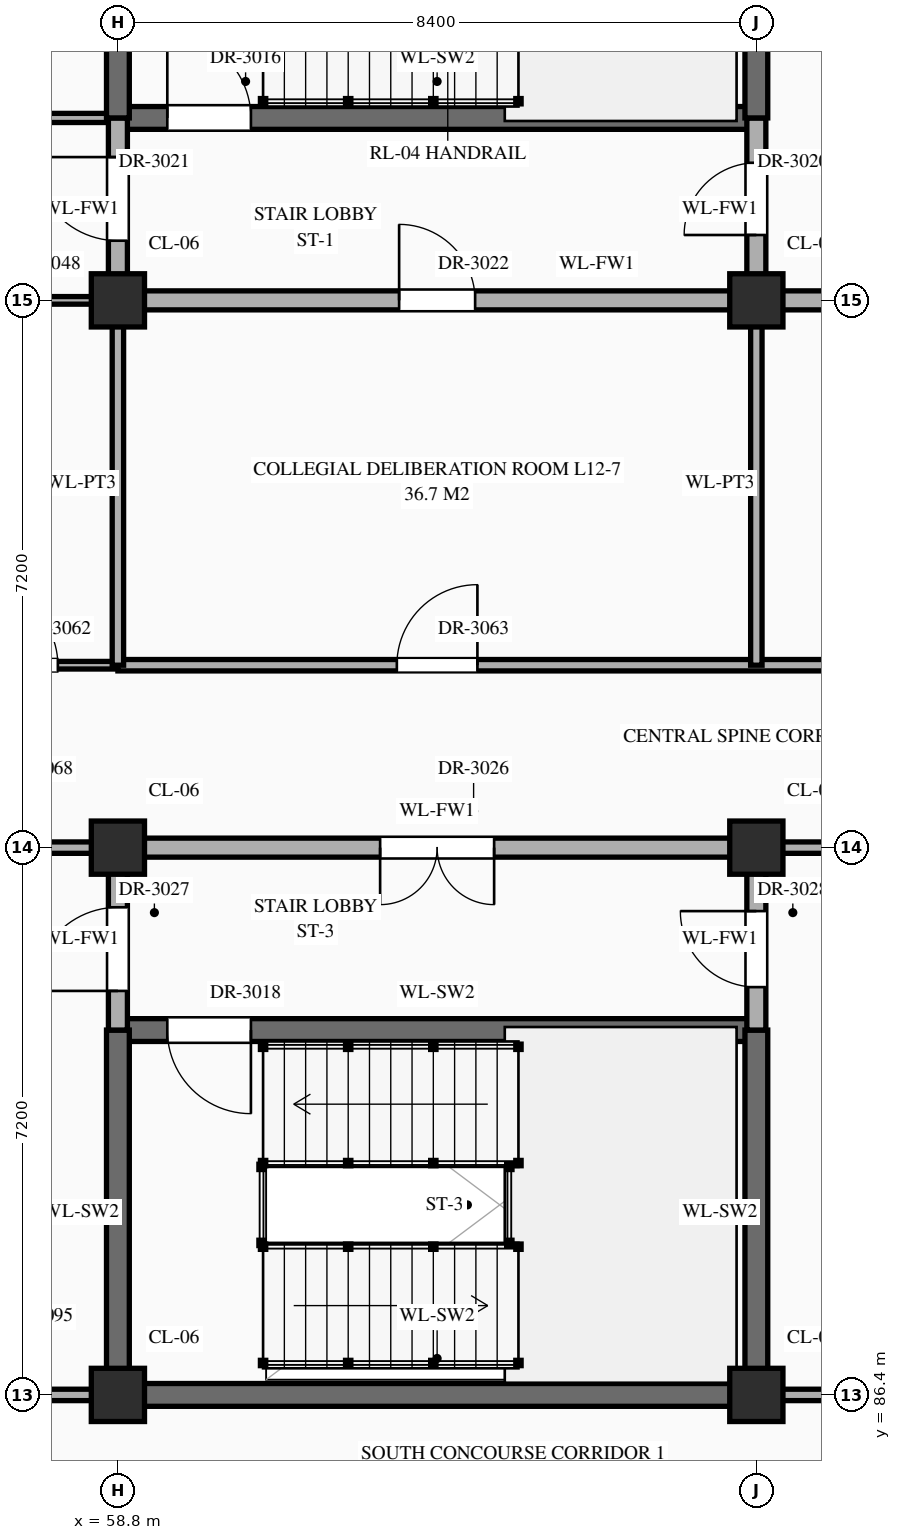
"""IFC4 building model, lengths in metres.
Left out: names, types, materials, properties, quantities, classifications, styles, units other than length and angle.
Written with IfcOpenShell. Run it as: python <this file> out.ifc"""

import sys

from ifc_helpers import new_model, si_unit, direction, frame, frame_2d, origin, origin_2d, place, context, subcontext, project, spatial, rectangle, extrude, element, fill, save


model = new_model("IFC4")
c1 = context("Model", 3, precision=1e-05, world=origin(), true_north=direction((0.0, 1.0)))
c2 = subcontext(c1, "Body", "Model", "MODEL_VIEW")
j1 = project(units=[si_unit("LENGTHUNIT", "METRE"), si_unit("PLANEANGLEUNIT", "RADIAN")], contexts=[c1])
p1 = place(None, origin())
s1 = spatial("IfcSite", under=j1, at=p1, CompositionType="ELEMENT")
p2 = place(p1, origin())
s2 = spatial("IfcBuilding", under=s1, at=p2, CompositionType="ELEMENT")
p3 = place(p2, frame((0.0, 0.0, 51.9)))
s3 = spatial("IfcBuildingStorey", under=s2, at=p3, CompositionType="ELEMENT", Elevation=51.9)
for number, where, z_axis, x_axis in (
    (1, (58.8, 86.4, 0.0), (0.0, 0.0, 1.0), (1.0, 0.0, 0.0)),
    (2, (58.8, 93.6, 0.0), (0.0, 0.0, 1.0), (1.0, 0.0, 0.0)),
    (3, (58.8, 100.8, 0.0), (0.0, 0.0, 1.0), (1.0, 0.0, 0.0)),
    (4, (67.2, 86.4, 0.0), (0.0, 0.0, 1.0), (1.0, 0.0, 0.0)),
    (5, (67.2, 93.6, 0.0), (0.0, 0.0, 1.0), (1.0, 0.0, 0.0)),
    (6, (67.2, 100.8, 0.0), (0.0, 0.0, 1.0), (1.0, 0.0, 0.0)),
):
    element("IfcColumn", number, at=place(p3, frame(where, z_axis=z_axis, x_axis=x_axis)), inside=s3, PredefinedType="COLUMN", context=c2, shape_type="SweptSolid", body=[
        extrude(rectangle(XDim=0.7, YDim=0.7, at=origin_2d()), origin(), (0.0, 0.0, 1.0), 4.2),
    ])
p4 = place(p3, frame((56.0, 86.4, 0.0), z_axis=(0.0, 0.0, 1.0), x_axis=(1.0, 0.0, 0.0)))
e7 = element("IfcWall", 7, at=p4, inside=s3, PredefinedType="STANDARD", context=c2, shape_type="SweptSolid", body=[
    extrude(rectangle(XDim=2.8, YDim=0.15, at=frame_2d((1.4, 0.0))), origin(), (0.0, 0.0, 1.0), 3.11),
])
p5 = place(p4, frame((0.775, 0.0, 0.0)))
e8 = element("IfcOpeningElement", 8, at=p5, cuts=e7, PredefinedType="OPENING", context=c2, shape_type="SweptSolid", body=[
    extrude(rectangle(XDim=0.98, YDim=2.35, at=frame_2d((0.49, 1.175))), frame((0.0, 0.087, 0.0), z_axis=(0.0, -1.0, 0.0), x_axis=(1.0, 0.0, 0.0)), (0.0, 0.0, 1.0), 0.174),
])
p6 = place(p3, frame((58.8, 86.4, 0.0), z_axis=(0.0, 0.0, 1.0), x_axis=(1.0, 0.0, 0.0)))
e9 = element("IfcWall", 9, at=p6, inside=s3, PredefinedType="SHEAR", context=c2, shape_type="SweptSolid", body=[
    extrude(rectangle(XDim=8.4, YDim=0.3, at=frame_2d((4.2, 0.0))), origin(), (0.0, 0.0, 1.0), 3.96),
])
p7 = place(p3, frame((67.2, 86.4, 0.0), z_axis=(0.0, 0.0, 1.0), x_axis=(1.0, 0.0, 0.0)))
e10 = element("IfcWall", 10, at=p7, inside=s3, PredefinedType="STANDARD", context=c2, shape_type="SweptSolid", body=[
    extrude(rectangle(XDim=8.4, YDim=0.15, at=frame_2d((4.2, 0.0))), origin(), (0.0, 0.0, 1.0), 3.11),
])
p8 = place(p7, frame((3.69, 0.0, 0.0)))
e11 = element("IfcOpeningElement", 11, at=p8, cuts=e10, PredefinedType="OPENING", context=c2, shape_type="SweptSolid", body=[
    extrude(rectangle(XDim=1.02, YDim=2.4, at=frame_2d((0.51, 1.2))), frame((0.0, 0.087, 0.0), z_axis=(0.0, -1.0, 0.0), x_axis=(1.0, 0.0, 0.0)), (0.0, 0.0, 1.0), 0.174),
])
p9 = place(p3, frame((58.8, 91.2, 0.0), z_axis=(0.0, 0.0, 1.0), x_axis=(1.0, 0.0, 0.0)))
e12 = element("IfcWall", 12, at=p9, inside=s3, PredefinedType="SHEAR", context=c2, shape_type="SweptSolid", body=[
    extrude(rectangle(XDim=8.4, YDim=0.3, at=frame_2d((4.2, 0.0))), origin(), (0.0, 0.0, 1.0), 3.96),
])
p10 = place(p9, frame((0.65, 0.0, 0.0)))
e13 = element("IfcOpeningElement", 13, at=p10, cuts=e12, PredefinedType="OPENING", context=c2, shape_type="SweptSolid", body=[
    extrude(rectangle(XDim=1.1, YDim=2.2, at=frame_2d((0.55, 1.1))), frame((0.0, 0.162, 0.0), z_axis=(0.0, -1.0, 0.0), x_axis=(1.0, 0.0, 0.0)), (0.0, 0.0, 1.0), 0.324),
])
p11 = place(p3, frame((56.0, 93.6, 0.0), z_axis=(0.0, 0.0, 1.0), x_axis=(1.0, 0.0, 0.0)))
e14 = element("IfcWall", 14, at=p11, inside=s3, PredefinedType="STANDARD", context=c2, shape_type="SweptSolid", body=[
    extrude(rectangle(XDim=2.8, YDim=0.15, at=frame_2d((1.4, 0.0))), origin(), (0.0, 0.0, 1.0), 3.11),
])
p12 = place(p11, frame((0.785, 0.0, 0.0)))
e15 = element("IfcOpeningElement", 15, at=p12, cuts=e14, PredefinedType="OPENING", context=c2, shape_type="SweptSolid", body=[
    extrude(rectangle(XDim=0.96, YDim=2.2, at=frame_2d((0.48, 1.1))), frame((0.0, 0.087, 0.0), z_axis=(0.0, -1.0, 0.0), x_axis=(1.0, 0.0, 0.0)), (0.0, 0.0, 1.0), 0.174),
])
p13 = place(p3, frame((58.8, 93.6, 0.0), z_axis=(0.0, 0.0, 1.0), x_axis=(1.0, 0.0, 0.0)))
e16 = element("IfcWall", 16, at=p13, inside=s3, PredefinedType="STANDARD", context=c2, shape_type="SweptSolid", body=[
    extrude(rectangle(XDim=8.4, YDim=0.25, at=frame_2d((4.2, 0.0))), origin(), (0.0, 0.0, 1.0), 3.11),
])
p14 = place(p13, frame((3.45, 0.0, 0.0)))
e17 = element("IfcOpeningElement", 17, at=p14, cuts=e16, PredefinedType="OPENING", context=c2, shape_type="SweptSolid", body=[
    extrude(rectangle(XDim=1.5, YDim=2.25, at=frame_2d((0.75, 1.125))), frame((0.0, 0.137, 0.0), z_axis=(0.0, -1.0, 0.0), x_axis=(1.0, 0.0, 0.0)), (0.0, 0.0, 1.0), 0.274),
])
p15 = place(p3, frame((67.2, 93.6, 0.0), z_axis=(0.0, 0.0, 1.0), x_axis=(1.0, 0.0, 0.0)))
e18 = element("IfcWall", 18, at=p15, inside=s3, PredefinedType="STANDARD", context=c2, shape_type="SweptSolid", body=[
    extrude(rectangle(XDim=8.4, YDim=0.15, at=frame_2d((4.2, 0.0))), origin(), (0.0, 0.0, 1.0), 3.11),
])
p16 = place(p15, frame((3.7, 0.0, 0.0)))
e19 = element("IfcOpeningElement", 19, at=p16, cuts=e18, PredefinedType="OPENING", context=c2, shape_type="SweptSolid", body=[
    extrude(rectangle(XDim=1.0, YDim=2.25, at=frame_2d((0.5, 1.125))), frame((0.0, 0.087, 0.0), z_axis=(0.0, -1.0, 0.0), x_axis=(1.0, 0.0, 0.0)), (0.0, 0.0, 1.0), 0.174),
])
p17 = place(p3, frame((50.44, 96.0, 0.0), z_axis=(0.0, 0.0, 1.0), x_axis=(1.0, 0.0, 0.0)))
e20 = element("IfcWall", 20, at=p17, inside=s3, PredefinedType="STANDARD", context=c2, shape_type="SweptSolid", body=[
    extrude(rectangle(XDim=8.36, YDim=0.1, at=frame_2d((4.18, 0.0))), origin(), (0.0, 0.0, 1.0), 3.96),
])
p18 = place(p17, frame((1.21, 0.0, 0.0)))
e21 = element("IfcOpeningElement", 21, at=p18, cuts=e20, PredefinedType="OPENING", context=c2, shape_type="SweptSolid", body=[
    extrude(rectangle(XDim=0.94, YDim=2.3, at=frame_2d((0.47, 1.15))), frame((0.0, 0.062, 0.0), z_axis=(0.0, -1.0, 0.0), x_axis=(1.0, 0.0, 0.0)), (0.0, 0.0, 1.0), 0.124),
])
p19 = place(p17, frame((4.07, 0.0, 0.0)))
e22 = element("IfcOpeningElement", 22, at=p19, cuts=e20, PredefinedType="OPENING", context=c2, shape_type="SweptSolid", body=[
    extrude(rectangle(XDim=0.98, YDim=2.35, at=frame_2d((0.49, 1.175))), frame((0.0, 0.062, 0.0), z_axis=(0.0, -1.0, 0.0), x_axis=(1.0, 0.0, 0.0)), (0.0, 0.0, 1.0), 0.124),
])
p20 = place(p17, frame((6.55, 0.0, 0.0)))
e23 = element("IfcOpeningElement", 23, at=p20, cuts=e20, PredefinedType="OPENING", context=c2, shape_type="SweptSolid", body=[
    extrude(rectangle(XDim=1.02, YDim=2.4, at=frame_2d((0.51, 1.2))), frame((0.0, 0.062, 0.0), z_axis=(0.0, -1.0, 0.0), x_axis=(1.0, 0.0, 0.0)), (0.0, 0.0, 1.0), 0.124),
])
p21 = place(p3, frame((58.8, 96.0, 0.0), z_axis=(0.0, 0.0, 1.0), x_axis=(1.0, 0.0, 0.0)))
e24 = element("IfcWall", 24, at=p21, inside=s3, PredefinedType="STANDARD", context=c2, shape_type="SweptSolid", body=[
    extrude(rectangle(XDim=25.2, YDim=0.15, at=frame_2d((12.6, 0.0))), origin(), (0.0, 0.0, 1.0), 3.96),
])
p22 = place(p21, frame((3.67, 0.0, 0.0)))
e25 = element("IfcOpeningElement", 25, at=p22, cuts=e24, PredefinedType="OPENING", context=c2, shape_type="SweptSolid", body=[
    extrude(rectangle(XDim=1.06, YDim=2.4, at=frame_2d((0.53, 1.2))), frame((0.0, 0.087, 0.0), z_axis=(0.0, -1.0, 0.0), x_axis=(1.0, 0.0, 0.0)), (0.0, 0.0, 1.0), 0.174),
])
p23 = place(p21, frame((12.03, 0.0, 0.0)))
e26 = element("IfcOpeningElement", 26, at=p23, cuts=e24, PredefinedType="OPENING", context=c2, shape_type="SweptSolid", body=[
    extrude(rectangle(XDim=1.14, YDim=2.4, at=frame_2d((0.57, 1.2))), frame((0.0, 0.087, 0.0), z_axis=(0.0, -1.0, 0.0), x_axis=(1.0, 0.0, 0.0)), (0.0, 0.0, 1.0), 0.174),
])
p24 = place(p21, frame((20.55, 0.0, 0.0)))
e27 = element("IfcOpeningElement", 27, at=p24, cuts=e24, PredefinedType="OPENING", context=c2, shape_type="SweptSolid", body=[
    extrude(rectangle(XDim=0.9, YDim=2.15, at=frame_2d((0.45, 1.075))), frame((0.0, 0.087, 0.0), z_axis=(0.0, -1.0, 0.0), x_axis=(1.0, 0.0, 0.0)), (0.0, 0.0, 1.0), 0.174),
])
p25 = place(p3, frame((50.44, 100.8, 0.0), z_axis=(0.0, 0.0, 1.0), x_axis=(1.0, 0.0, 0.0)))
e28 = element("IfcWall", 28, at=p25, inside=s3, PredefinedType="STANDARD", context=c2, shape_type="SweptSolid", body=[
    extrude(rectangle(XDim=8.36, YDim=0.1, at=frame_2d((4.18, 0.0))), origin(), (0.0, 0.0, 1.0), 3.11),
])
p26 = place(p25, frame((1.265, 0.0, 0.0)))
e29 = element("IfcOpeningElement", 29, at=p26, cuts=e28, PredefinedType="OPENING", context=c2, shape_type="SweptSolid", body=[
    extrude(rectangle(XDim=1.06, YDim=2.4, at=frame_2d((0.53, 1.2))), frame((0.0, 0.062, 0.0), z_axis=(0.0, -1.0, 0.0), x_axis=(1.0, 0.0, 0.0)), (0.0, 0.0, 1.0), 0.124),
])
p27 = place(p25, frame((3.99, 0.0, 0.0)))
e30 = element("IfcOpeningElement", 30, at=p27, cuts=e28, PredefinedType="OPENING", context=c2, shape_type="SweptSolid", body=[
    extrude(rectangle(XDim=1.14, YDim=2.4, at=frame_2d((0.57, 1.2))), frame((0.0, 0.062, 0.0), z_axis=(0.0, -1.0, 0.0), x_axis=(1.0, 0.0, 0.0)), (0.0, 0.0, 1.0), 0.124),
])
p28 = place(p25, frame((6.475, 0.0, 0.0)))
e31 = element("IfcOpeningElement", 31, at=p28, cuts=e28, PredefinedType="OPENING", context=c2, shape_type="SweptSolid", body=[
    extrude(rectangle(XDim=0.9, YDim=2.15, at=frame_2d((0.45, 1.075))), frame((0.0, 0.062, 0.0), z_axis=(0.0, -1.0, 0.0), x_axis=(1.0, 0.0, 0.0)), (0.0, 0.0, 1.0), 0.124),
])
p29 = place(p3, frame((58.8, 100.8, 0.0), z_axis=(0.0, 0.0, 1.0), x_axis=(1.0, 0.0, 0.0)))
e32 = element("IfcWall", 32, at=p29, inside=s3, PredefinedType="STANDARD", context=c2, shape_type="SweptSolid", body=[
    extrude(rectangle(XDim=12.6, YDim=0.25, at=frame_2d((6.3, 0.0))), origin(), (0.0, 0.0, 1.0), 3.11),
])
p30 = place(p29, frame((3.7, 0.0, 0.0)))
e33 = element("IfcOpeningElement", 33, at=p30, cuts=e32, PredefinedType="OPENING", context=c2, shape_type="SweptSolid", body=[
    extrude(rectangle(XDim=1.0, YDim=2.2, at=frame_2d((0.5, 1.1))), frame((0.0, 0.137, 0.0), z_axis=(0.0, -1.0, 0.0), x_axis=(1.0, 0.0, 0.0)), (0.0, 0.0, 1.0), 0.274),
])
p31 = place(p3, frame((50.44, 103.2, 0.0), z_axis=(0.0, 0.0, 1.0), x_axis=(1.0, 0.0, 0.0)))
e34 = element("IfcWall", 34, at=p31, inside=s3, PredefinedType="STANDARD", context=c2, shape_type="SweptSolid", body=[
    extrude(rectangle(XDim=8.36, YDim=0.12, at=frame_2d((4.18, 0.0))), origin(), (0.0, 0.0, 1.0), 3.96),
])
p32 = place(p31, frame((3.67, 0.0, 0.0)))
e35 = element("IfcOpeningElement", 35, at=p32, cuts=e34, PredefinedType="OPENING", context=c2, shape_type="SweptSolid", body=[
    extrude(rectangle(XDim=1.02, YDim=2.4, at=frame_2d((0.51, 1.2))), frame((0.0, 0.072, 0.0), z_axis=(0.0, -1.0, 0.0), x_axis=(1.0, 0.0, 0.0)), (0.0, 0.0, 1.0), 0.144),
])
p33 = place(p3, frame((58.8, 103.2, 0.0), z_axis=(0.0, 0.0, 1.0), x_axis=(1.0, 0.0, 0.0)))
e36 = element("IfcWall", 36, at=p33, inside=s3, PredefinedType="SHEAR", context=c2, shape_type="SweptSolid", body=[
    extrude(rectangle(XDim=8.4, YDim=0.3, at=frame_2d((4.2, 0.0))), origin(), (0.0, 0.0, 1.0), 3.96),
])
p34 = place(p33, frame((0.65, 0.0, 0.0)))
e37 = element("IfcOpeningElement", 37, at=p34, cuts=e36, PredefinedType="OPENING", context=c2, shape_type="SweptSolid", body=[
    extrude(rectangle(XDim=1.1, YDim=2.2, at=frame_2d((0.55, 1.1))), frame((0.0, 0.162, 0.0), z_axis=(0.0, -1.0, 0.0), x_axis=(1.0, 0.0, 0.0)), (0.0, 0.0, 1.0), 0.324),
])
p35 = place(p3, frame((58.8, 86.4, 0.0), z_axis=(0.0, 0.0, 1.0), x_axis=(0.0, 1.0, 0.0)))
e38 = element("IfcWall", 38, at=p35, inside=s3, PredefinedType="SHEAR", context=c2, shape_type="SweptSolid", body=[
    extrude(rectangle(XDim=4.8, YDim=0.3, at=frame_2d((2.4, 0.0))), origin(), (0.0, 0.0, 1.0), 3.96),
])
p36 = place(p3, frame((58.8, 91.2, 0.0), z_axis=(0.0, 0.0, 1.0), x_axis=(0.0, 1.0, 0.0)))
e39 = element("IfcWall", 39, at=p36, inside=s3, PredefinedType="STANDARD", context=c2, shape_type="SweptSolid", body=[
    extrude(rectangle(XDim=2.4, YDim=0.25, at=frame_2d((1.2, 0.0))), origin(), (0.0, 0.0, 1.0), 3.21),
])
p37 = place(p36, frame((0.515, 0.0, 0.0)))
e40 = element("IfcOpeningElement", 40, at=p37, cuts=e39, PredefinedType="OPENING", context=c2, shape_type="SweptSolid", body=[
    extrude(rectangle(XDim=1.1, YDim=2.2, at=frame_2d((0.55, 1.1))), frame((0.0, 0.137, 0.0), z_axis=(0.0, -1.0, 0.0), x_axis=(1.0, 0.0, 0.0)), (0.0, 0.0, 1.0), 0.274),
])
p38 = place(p3, frame((58.8, 96.0, 0.0), z_axis=(0.0, 0.0, 1.0), x_axis=(0.0, 1.0, 0.0)))
e41 = element("IfcWall", 41, at=p38, inside=s3, PredefinedType="STANDARD", context=c2, shape_type="SweptSolid", body=[
    extrude(rectangle(XDim=4.8, YDim=0.15, at=frame_2d((2.4, 0.0))), origin(), (0.0, 0.0, 1.0), 3.21),
])
p39 = place(p3, frame((58.8, 100.8, 0.0), z_axis=(0.0, 0.0, 1.0), x_axis=(0.0, 1.0, 0.0)))
e42 = element("IfcWall", 42, at=p39, inside=s3, PredefinedType="STANDARD", context=c2, shape_type="SweptSolid", body=[
    extrude(rectangle(XDim=2.4, YDim=0.25, at=frame_2d((1.2, 0.0))), origin(), (0.0, 0.0, 1.0), 3.21),
])
p40 = place(p39, frame((0.785, 0.0, 0.0)))
e43 = element("IfcOpeningElement", 43, at=p40, cuts=e42, PredefinedType="OPENING", context=c2, shape_type="SweptSolid", body=[
    extrude(rectangle(XDim=1.1, YDim=2.2, at=frame_2d((0.55, 1.1))), frame((0.0, 0.137, 0.0), z_axis=(0.0, -1.0, 0.0), x_axis=(1.0, 0.0, 0.0)), (0.0, 0.0, 1.0), 0.274),
])
p41 = place(p3, frame((58.8, 103.2, 0.0), z_axis=(0.0, 0.0, 1.0), x_axis=(0.0, 1.0, 0.0)))
e44 = element("IfcWall", 44, at=p41, inside=s3, PredefinedType="SHEAR", context=c2, shape_type="SweptSolid", body=[
    extrude(rectangle(XDim=4.76, YDim=0.3, at=frame_2d((2.38, 0.0))), origin(), (0.0, 0.0, 1.0), 3.96),
])
p42 = place(p3, frame((67.2, 86.4, 0.0), z_axis=(0.0, 0.0, 1.0), x_axis=(0.0, 1.0, 0.0)))
e45 = element("IfcWall", 45, at=p42, inside=s3, PredefinedType="SHEAR", context=c2, shape_type="SweptSolid", body=[
    extrude(rectangle(XDim=4.8, YDim=0.3, at=frame_2d((2.4, 0.0))), origin(), (0.0, 0.0, 1.0), 3.96),
])
p43 = place(p3, frame((67.2, 91.2, 0.0), z_axis=(0.0, 0.0, 1.0), x_axis=(0.0, 1.0, 0.0)))
e46 = element("IfcWall", 46, at=p43, inside=s3, PredefinedType="STANDARD", context=c2, shape_type="SweptSolid", body=[
    extrude(rectangle(XDim=2.4, YDim=0.25, at=frame_2d((1.2, 0.0))), origin(), (0.0, 0.0, 1.0), 3.21),
])
p44 = place(p43, frame((0.565, 0.0, 0.0)))
e47 = element("IfcOpeningElement", 47, at=p44, cuts=e46, PredefinedType="OPENING", context=c2, shape_type="SweptSolid", body=[
    extrude(rectangle(XDim=1.0, YDim=2.2, at=frame_2d((0.5, 1.1))), frame((0.0, 0.137, 0.0), z_axis=(0.0, -1.0, 0.0), x_axis=(1.0, 0.0, 0.0)), (0.0, 0.0, 1.0), 0.274),
])
p45 = place(p3, frame((67.2, 96.0, 0.0), z_axis=(0.0, 0.0, 1.0), x_axis=(0.0, 1.0, 0.0)))
e48 = element("IfcWall", 48, at=p45, inside=s3, PredefinedType="STANDARD", context=c2, shape_type="SweptSolid", body=[
    extrude(rectangle(XDim=4.8, YDim=0.15, at=frame_2d((2.4, 0.0))), origin(), (0.0, 0.0, 1.0), 3.21),
])
p46 = place(p3, frame((67.2, 100.8, 0.0), z_axis=(0.0, 0.0, 1.0), x_axis=(0.0, 1.0, 0.0)))
e49 = element("IfcWall", 49, at=p46, inside=s3, PredefinedType="STANDARD", context=c2, shape_type="SweptSolid", body=[
    extrude(rectangle(XDim=2.4, YDim=0.25, at=frame_2d((1.2, 0.0))), origin(), (0.0, 0.0, 1.0), 3.21),
])
p47 = place(p46, frame((0.86, 0.0, 0.0)))
e50 = element("IfcOpeningElement", 50, at=p47, cuts=e49, PredefinedType="OPENING", context=c2, shape_type="SweptSolid", body=[
    extrude(rectangle(XDim=0.95, YDim=2.15, at=frame_2d((0.475, 1.075))), frame((0.0, 0.137, 0.0), z_axis=(0.0, -1.0, 0.0), x_axis=(1.0, 0.0, 0.0)), (0.0, 0.0, 1.0), 0.274),
])
p48 = place(p3, frame((67.2, 103.2, 0.0), z_axis=(0.0, 0.0, 1.0), x_axis=(0.0, 1.0, 0.0)))
e51 = element("IfcWall", 51, at=p48, inside=s3, PredefinedType="SHEAR", context=c2, shape_type="SweptSolid", body=[
    extrude(rectangle(XDim=1.2, YDim=0.3, at=frame_2d((0.6, 0.0))), origin(), (0.0, 0.0, 1.0), 3.96),
])
p49 = place(p34, origin())
e52 = element("IfcDoor", 52, at=p49, inside=s3, OperationType="SINGLE_SWING_LEFT", PredefinedType="DOOR", context=c2, shape_type="SweptSolid", body=[
    extrude(rectangle(XDim=1.1, YDim=2.2, at=frame_2d((0.55, 1.1))), frame((0.0, 0.025, 0.0), z_axis=(0.0, -1.0, 0.0), x_axis=(1.0, 0.0, 0.0)), (0.0, 0.0, 1.0), 0.05),
])
fill(e37, e52)
p50 = place(p10, frame((1.1, 0.0, 0.0), z_axis=(0.0, 0.0, 1.0), x_axis=(-1.0, 0.0, 0.0)))
e53 = element("IfcDoor", 53, at=p50, inside=s3, OperationType="SINGLE_SWING_LEFT", PredefinedType="DOOR", context=c2, shape_type="SweptSolid", body=[
    extrude(rectangle(XDim=1.1, YDim=2.2, at=frame_2d((0.55, 1.1))), frame((0.0, 0.025, 0.0), z_axis=(0.0, -1.0, 0.0), x_axis=(1.0, 0.0, 0.0)), (0.0, 0.0, 1.0), 0.05),
])
fill(e13, e53)
p51 = place(p47, origin())
e54 = element("IfcDoor", 54, at=p51, inside=s3, OperationType="SINGLE_SWING_LEFT", PredefinedType="DOOR", context=c2, shape_type="SweptSolid", body=[
    extrude(rectangle(XDim=0.95, YDim=2.15, at=frame_2d((0.475, 1.075))), frame((0.0, 0.025, 0.0), z_axis=(0.0, -1.0, 0.0), x_axis=(1.0, 0.0, 0.0)), (0.0, 0.0, 1.0), 0.05),
])
fill(e50, e54)
p52 = place(p40, origin())
e55 = element("IfcDoor", 55, at=p52, inside=s3, OperationType="SINGLE_SWING_RIGHT", PredefinedType="DOOR", context=c2, shape_type="SweptSolid", body=[
    extrude(rectangle(XDim=1.1, YDim=2.2, at=frame_2d((0.55, 1.1))), frame((0.0, 0.025, 0.0), z_axis=(0.0, -1.0, 0.0), x_axis=(1.0, 0.0, 0.0)), (0.0, 0.0, 1.0), 0.05),
])
fill(e43, e55)
p53 = place(p30, origin())
e56 = element("IfcDoor", 56, at=p53, inside=s3, OperationType="SINGLE_SWING_LEFT", PredefinedType="DOOR", context=c2, shape_type="SweptSolid", body=[
    extrude(rectangle(XDim=1.0, YDim=2.2, at=frame_2d((0.5, 1.1))), frame((0.0, 0.025, 0.0), z_axis=(0.0, -1.0, 0.0), x_axis=(1.0, 0.0, 0.0)), (0.0, 0.0, 1.0), 0.05),
])
fill(e33, e56)
p54 = place(p14, frame((1.5, 0.0, 0.0), z_axis=(0.0, 0.0, 1.0), x_axis=(-1.0, 0.0, 0.0)))
e57 = element("IfcDoor", 57, at=p54, inside=s3, OperationType="DOUBLE_DOOR_SINGLE_SWING", PredefinedType="DOOR", context=c2, shape_type="SweptSolid", body=[
    extrude(rectangle(XDim=1.5, YDim=2.25, at=frame_2d((0.75, 1.125))), frame((0.0, 0.025, 0.0), z_axis=(0.0, -1.0, 0.0), x_axis=(1.0, 0.0, 0.0)), (0.0, 0.0, 1.0), 0.05),
])
fill(e17, e57)
p55 = place(p37, origin())
e58 = element("IfcDoor", 58, at=p55, inside=s3, OperationType="SINGLE_SWING_LEFT", PredefinedType="DOOR", context=c2, shape_type="SweptSolid", body=[
    extrude(rectangle(XDim=1.1, YDim=2.2, at=frame_2d((0.55, 1.1))), frame((0.0, 0.025, 0.0), z_axis=(0.0, -1.0, 0.0), x_axis=(1.0, 0.0, 0.0)), (0.0, 0.0, 1.0), 0.05),
])
fill(e40, e58)
p56 = place(p44, origin())
e59 = element("IfcDoor", 59, at=p56, inside=s3, OperationType="SINGLE_SWING_RIGHT", PredefinedType="DOOR", context=c2, shape_type="SweptSolid", body=[
    extrude(rectangle(XDim=1.0, YDim=2.2, at=frame_2d((0.5, 1.1))), frame((0.0, 0.025, 0.0), z_axis=(0.0, -1.0, 0.0), x_axis=(1.0, 0.0, 0.0)), (0.0, 0.0, 1.0), 0.05),
])
fill(e47, e59)
p57 = place(p20, origin())
e60 = element("IfcDoor", 60, at=p57, inside=s3, OperationType="SINGLE_SWING_LEFT", PredefinedType="DOOR", context=c2, shape_type="SweptSolid", body=[
    extrude(rectangle(XDim=1.02, YDim=2.4, at=frame_2d((0.51, 1.2))), frame((0.0, 0.025, 0.0), z_axis=(0.0, -1.0, 0.0), x_axis=(1.0, 0.0, 0.0)), (0.0, 0.0, 1.0), 0.05),
])
fill(e23, e60)
p58 = place(p22, origin())
e61 = element("IfcDoor", 61, at=p58, inside=s3, OperationType="SINGLE_SWING_RIGHT", PredefinedType="DOOR", context=c2, shape_type="SweptSolid", body=[
    extrude(rectangle(XDim=1.06, YDim=2.4, at=frame_2d((0.53, 1.2))), frame((0.0, 0.025, 0.0), z_axis=(0.0, -1.0, 0.0), x_axis=(1.0, 0.0, 0.0)), (0.0, 0.0, 1.0), 0.05),
])
fill(e25, e61)
save(model, sys.argv[1])
